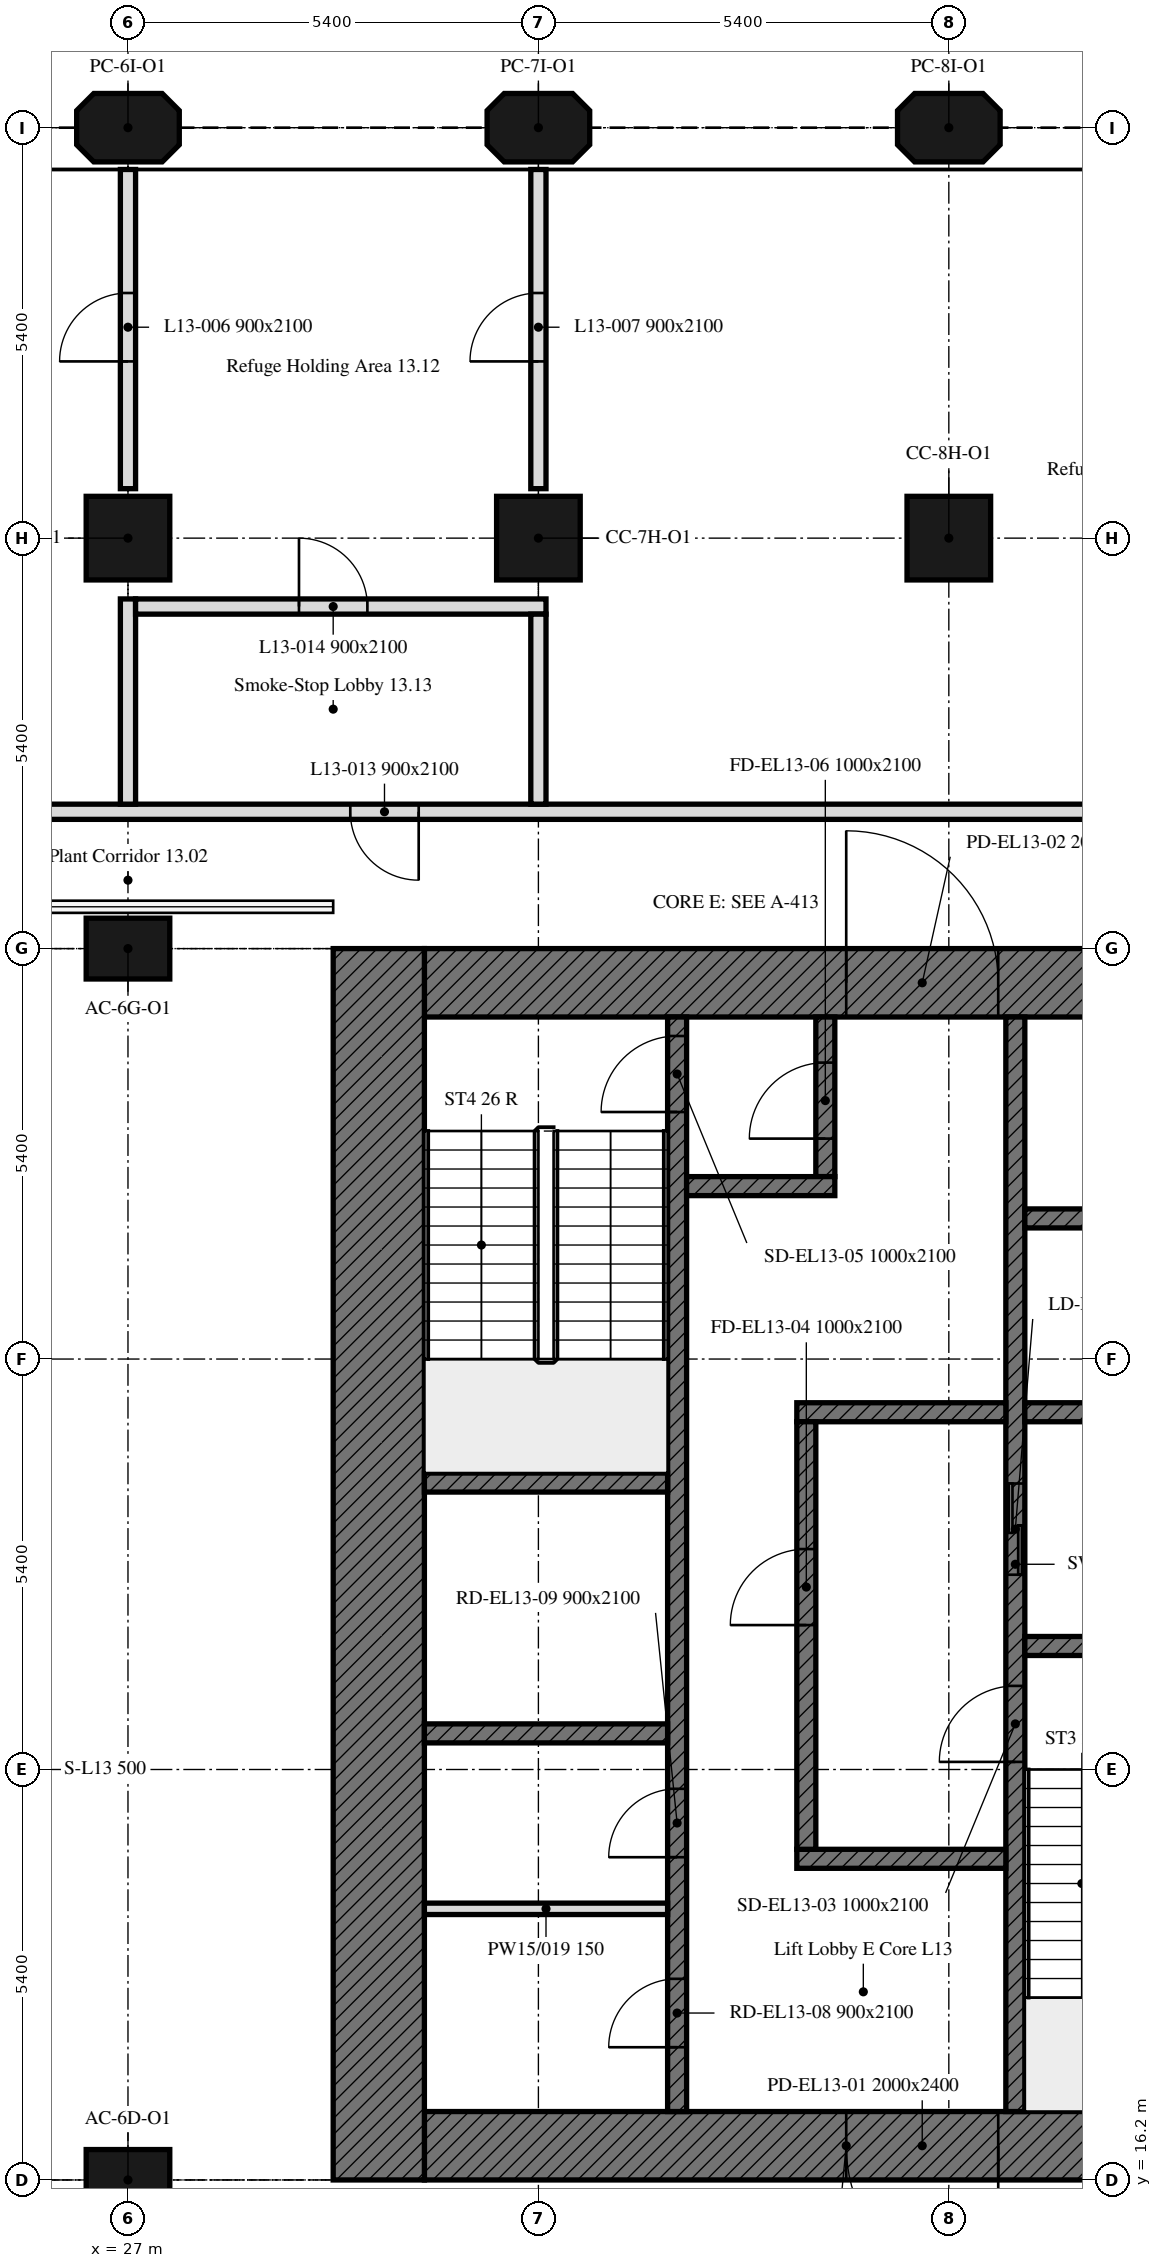
"""IFC4 building model, lengths in metres.
Left out: names, types, materials, properties, quantities, classifications, styles, units other than length and angle.
Written with IfcOpenShell. Run it as: python <this file> out.ifc"""

import sys

from ifc_helpers import new_model, si_unit, direction, frame, frame_2d, origin, origin_2d, place, context, subcontext, project, spatial, polyline, rectangle, outline, extrude, element, fill, save


model = new_model("IFC4")
c1 = context("Model", 3, precision=1e-05, world=origin(), true_north=direction((0.0, 1.0)))
c2 = subcontext(c1, "Body", "Model", "MODEL_VIEW")
j1 = project(units=[si_unit("LENGTHUNIT", "METRE"), si_unit("PLANEANGLEUNIT", "RADIAN")], contexts=[c1])
p1 = place(None, origin())
s1 = spatial("IfcSite", under=j1, at=p1, CompositionType="ELEMENT")
p2 = place(p1, origin())
s2 = spatial("IfcBuilding", under=s1, at=p2, CompositionType="ELEMENT")
p3 = place(p2, frame((0.0, 0.0, 60.2)))
s3 = spatial("IfcBuildingStorey", under=s2, at=p3, CompositionType="ELEMENT", Elevation=60.2)
for number, where, z_axis, x_axis in (
    (1, (27.0, 16.2, 0.0), (0.0, 0.0, 1.0), (1.0, 0.0, 0.0)),
    (2, (27.0, 32.4, 0.0), (0.0, 0.0, 1.0), (1.0, 0.0, 0.0)),
):
    element("IfcColumn", number, at=place(p3, frame(where, z_axis=z_axis, x_axis=x_axis)), inside=s3, PredefinedType="COLUMN", context=c2, shape_type="SweptSolid", body=[
        extrude(rectangle(XDim=1.1, YDim=0.8, at=origin_2d()), origin(), (0.0, 0.0, 1.0), 4.5),
    ])
for number, where, z_axis, x_axis in (
    (3, (27.0, 37.8, 0.0), (0.0, 0.0, 1.0), (1.0, 0.0, 0.0)),
    (4, (32.4, 37.8, 0.0), (0.0, 0.0, 1.0), (1.0, 0.0, 0.0)),
    (5, (37.8, 37.8, 0.0), (0.0, 0.0, 1.0), (1.0, 0.0, 0.0)),
):
    element("IfcColumn", number, at=place(p3, frame(where, z_axis=z_axis, x_axis=x_axis)), inside=s3, PredefinedType="COLUMN", context=c2, shape_type="SweptSolid", body=[
        extrude(rectangle(XDim=1.1, YDim=1.1, at=origin_2d()), origin(), (0.0, 0.0, 1.0), 4.5),
    ])
for number, where, z_axis, x_axis in (
    (6, (27.0, 43.2, 0.0), (0.0, 0.0, 1.0), (1.0, 0.0, 0.0)),
    (7, (32.4, 43.2, 0.0), (0.0, 0.0, 1.0), (1.0, 0.0, 0.0)),
    (8, (37.8, 43.2, 0.0), (0.0, 0.0, 1.0), (1.0, 0.0, 0.0)),
):
    element("IfcColumn", number, at=place(p3, frame(where, z_axis=z_axis, x_axis=x_axis)), inside=s3, PredefinedType="COLUMN", context=c2, shape_type="SweptSolid", body=[
        extrude(outline(polyline([(-0.45, -0.45), (0.45, -0.45), (0.675, -0.225), (0.675, 0.225), (0.45, 0.45), (-0.45, 0.45), (-0.675, 0.225), (-0.675, -0.225), (-0.45, -0.45)])), origin(), (0.0, 0.0, 1.0), 4.5),
    ])
p4 = place(p3, frame((42.0, 16.65, 0.0), z_axis=(0.0, 0.0, 1.0), x_axis=(-1.0, 0.0, 0.0)))
e9 = element("IfcWall", 9, at=p4, inside=s3, PredefinedType="SOLIDWALL", context=c2, shape_type="SweptSolid", body=[
    extrude(rectangle(XDim=11.1, YDim=0.9, at=frame_2d((5.55, 0.0))), origin(), (0.0, 0.0, 1.0), 4.5),
])
p5 = place(p4, frame((3.55, 0.0, 0.0)))
e10 = element("IfcOpeningElement", 10, at=p5, cuts=e9, PredefinedType="OPENING", context=c2, shape_type="SweptSolid", body=[
    extrude(rectangle(XDim=2.0, YDim=2.4, at=frame_2d((1.0, 1.2))), frame((0.0, 0.45, 0.0), z_axis=(0.0, -1.0, 0.0), x_axis=(1.0, 0.0, 0.0)), (0.0, 0.0, 1.0), 0.9),
])
p6 = place(p3, frame((30.9, 31.95, 0.0), z_axis=(0.0, 0.0, 1.0), x_axis=(1.0, 0.0, 0.0)))
e11 = element("IfcWall", 11, at=p6, inside=s3, PredefinedType="SOLIDWALL", context=c2, shape_type="SweptSolid", body=[
    extrude(rectangle(XDim=11.1, YDim=0.9, at=frame_2d((5.55, 0.0))), origin(), (0.0, 0.0, 1.0), 4.5),
])
p7 = place(p6, frame((5.55, 0.0, 0.0)))
e12 = element("IfcOpeningElement", 12, at=p7, cuts=e11, PredefinedType="OPENING", context=c2, shape_type="SweptSolid", body=[
    extrude(rectangle(XDim=2.0, YDim=2.4, at=frame_2d((1.0, 1.2))), frame((0.0, 0.45, 0.0), z_axis=(0.0, -1.0, 0.0), x_axis=(1.0, 0.0, 0.0)), (0.0, 0.0, 1.0), 0.9),
])
p8 = place(p3, frame((30.3, 16.2, 0.0), z_axis=(0.0, 0.0, 1.0), x_axis=(0.0, 1.0, 0.0)))
e13 = element("IfcWall", 13, at=p8, inside=s3, PredefinedType="SOLIDWALL", context=c2, shape_type="SweptSolid", body=[
    extrude(rectangle(XDim=16.2, YDim=1.2, at=frame_2d((8.1, 0.0))), origin(), (0.0, 0.0, 1.0), 4.5),
])
p9 = place(p3, frame((38.675, 17.1, 0.0), z_axis=(0.0, 0.0, 1.0), x_axis=(0.0, 1.0, 0.0)))
e14 = element("IfcWall", 14, at=p9, inside=s3, PredefinedType="SOLIDWALL", context=c2, shape_type="SweptSolid", body=[
    extrude(rectangle(XDim=14.4, YDim=0.25, at=frame_2d((7.2, 0.0))), origin(), (0.0, 0.0, 1.0), 4.5),
])
p10 = place(p9, frame((4.6, 0.0, 0.0)))
e15 = element("IfcOpeningElement", 15, at=p10, cuts=e14, PredefinedType="OPENING", context=c2, shape_type="SweptSolid", body=[
    extrude(rectangle(XDim=1.0, YDim=2.1, at=frame_2d((0.5, 1.05))), frame((0.0, 0.125, 0.0), z_axis=(0.0, -1.0, 0.0), x_axis=(1.0, 0.0, 0.0)), (0.0, 0.0, 1.0), 0.25),
])
p11 = place(p9, frame((7.062, 0.0, 0.0)))
e16 = element("IfcOpeningElement", 16, at=p11, cuts=e14, PredefinedType="OPENING", context=c2, shape_type="SweptSolid", body=[
    extrude(rectangle(XDim=1.2, YDim=2.1, at=frame_2d((0.6, 1.05))), frame((0.0, 0.125, 0.0), z_axis=(0.0, -1.0, 0.0), x_axis=(1.0, 0.0, 0.0)), (0.0, 0.0, 1.0), 0.25),
])
p12 = place(p3, frame((34.225, 17.1, 0.0), z_axis=(0.0, 0.0, 1.0), x_axis=(0.0, 1.0, 0.0)))
e17 = element("IfcWall", 17, at=p12, inside=s3, PredefinedType="SOLIDWALL", context=c2, shape_type="SweptSolid", body=[
    extrude(rectangle(XDim=14.4, YDim=0.25, at=frame_2d((7.2, 0.0))), origin(), (0.0, 0.0, 1.0), 4.5),
])
p13 = place(p12, frame((13.15, 0.0, 0.0)))
e18 = element("IfcOpeningElement", 18, at=p13, cuts=e17, PredefinedType="OPENING", context=c2, shape_type="SweptSolid", body=[
    extrude(rectangle(XDim=1.0, YDim=2.1, at=frame_2d((0.5, 1.05))), frame((0.0, 0.125, 0.0), z_axis=(0.0, -1.0, 0.0), x_axis=(1.0, 0.0, 0.0)), (0.0, 0.0, 1.0), 0.25),
])
p14 = place(p12, frame((0.846, 0.0, 0.0)))
e19 = element("IfcOpeningElement", 19, at=p14, cuts=e17, PredefinedType="OPENING", context=c2, shape_type="SweptSolid", body=[
    extrude(rectangle(XDim=0.9, YDim=2.1, at=frame_2d((0.45, 1.05))), frame((0.0, 0.125, 0.0), z_axis=(0.0, -1.0, 0.0), x_axis=(1.0, 0.0, 0.0)), (0.0, 0.0, 1.0), 0.25),
])
p15 = place(p12, frame((3.346, 0.0, 0.0)))
e20 = element("IfcOpeningElement", 20, at=p15, cuts=e17, PredefinedType="OPENING", context=c2, shape_type="SweptSolid", body=[
    extrude(rectangle(XDim=0.9, YDim=2.1, at=frame_2d((0.45, 1.05))), frame((0.0, 0.125, 0.0), z_axis=(0.0, -1.0, 0.0), x_axis=(1.0, 0.0, 0.0)), (0.0, 0.0, 1.0), 0.25),
])
p16 = place(p3, frame((38.8, 23.225, 0.0), z_axis=(0.0, 0.0, 1.0), x_axis=(1.0, 0.0, 0.0)))
e21 = element("IfcWall", 21, at=p16, inside=s3, PredefinedType="SOLIDWALL", context=c2, shape_type="SweptSolid", body=[
    extrude(rectangle(XDim=3.2, YDim=0.25, at=frame_2d((1.6, 0.0))), origin(), (0.0, 0.0, 1.0), 4.5),
])
for number, where, z_axis, x_axis in (
    (22, (30.9, 25.375, 0.0), (0.0, 0.0, 1.0), (1.0, 0.0, 0.0)),
    (23, (30.9, 22.075, 0.0), (0.0, 0.0, 1.0), (1.0, 0.0, 0.0)),
):
    element("IfcWall", number, at=place(p3, frame(where, z_axis=z_axis, x_axis=x_axis)), inside=s3, PredefinedType="SOLIDWALL", context=c2, shape_type="SweptSolid", body=[
        extrude(rectangle(XDim=3.2, YDim=0.25, at=frame_2d((1.6, 0.0))), origin(), (0.0, 0.0, 1.0), 4.5),
    ])
p17 = place(p3, frame((38.8, 26.3, 0.0), z_axis=(0.0, 0.0, 1.0), x_axis=(1.0, 0.0, 0.0)))
e24 = element("IfcWall", 24, at=p17, inside=s3, PredefinedType="SOLIDWALL", context=c2, shape_type="SweptSolid", body=[
    extrude(rectangle(XDim=3.2, YDim=0.25, at=frame_2d((1.6, 0.0))), origin(), (0.0, 0.0, 1.0), 4.5),
])
for number, where, z_axis, x_axis in (
    (25, (35.8, 26.3, 0.0), (0.0, 0.0, 1.0), (1.0, 0.0, 0.0)),
    (26, (35.8, 20.425, 0.0), (0.0, 0.0, 1.0), (1.0, 0.0, 0.0)),
):
    element("IfcWall", number, at=place(p3, frame(where, z_axis=z_axis, x_axis=x_axis)), inside=s3, PredefinedType="SOLIDWALL", context=c2, shape_type="SweptSolid", body=[
        extrude(rectangle(XDim=2.75, YDim=0.25, at=frame_2d((1.375, 0.0))), origin(), (0.0, 0.0, 1.0), 4.5),
    ])
p18 = place(p3, frame((36.175, 29.4, 0.0), z_axis=(0.0, 0.0, 1.0), x_axis=(0.0, 1.0, 0.0)))
e27 = element("IfcWall", 27, at=p18, inside=s3, PredefinedType="SOLIDWALL", context=c2, shape_type="SweptSolid", body=[
    extrude(rectangle(XDim=2.1, YDim=0.25, at=frame_2d((1.05, 0.0))), origin(), (0.0, 0.0, 1.0), 4.5),
])
p19 = place(p18, frame((0.5, 0.0, 0.0)))
e28 = element("IfcOpeningElement", 28, at=p19, cuts=e27, PredefinedType="OPENING", context=c2, shape_type="SweptSolid", body=[
    extrude(rectangle(XDim=1.0, YDim=2.1, at=frame_2d((0.5, 1.05))), frame((0.0, 0.125, 0.0), z_axis=(0.0, -1.0, 0.0), x_axis=(1.0, 0.0, 0.0)), (0.0, 0.0, 1.0), 0.25),
])
p20 = place(p3, frame((34.35, 29.275, 0.0), z_axis=(0.0, 0.0, 1.0), x_axis=(1.0, 0.0, 0.0)))
e29 = element("IfcWall", 29, at=p20, inside=s3, PredefinedType="SOLIDWALL", context=c2, shape_type="SweptSolid", body=[
    extrude(rectangle(XDim=1.95, YDim=0.25, at=frame_2d((0.975, 0.0))), origin(), (0.0, 0.0, 1.0), 4.5),
])
p21 = place(p3, frame((35.925, 20.55, 0.0), z_axis=(0.0, 0.0, 1.0), x_axis=(0.0, 1.0, 0.0)))
e30 = element("IfcWall", 30, at=p21, inside=s3, PredefinedType="SOLIDWALL", context=c2, shape_type="SweptSolid", body=[
    extrude(rectangle(XDim=5.625, YDim=0.25, at=frame_2d((2.812, 0.0))), origin(), (0.0, 0.0, 1.0), 4.5),
])
p22 = place(p21, frame((2.95, 0.0, 0.0)))
e31 = element("IfcOpeningElement", 31, at=p22, cuts=e30, PredefinedType="OPENING", context=c2, shape_type="SweptSolid", body=[
    extrude(rectangle(XDim=1.0, YDim=2.1, at=frame_2d((0.5, 1.05))), frame((0.0, 0.125, 0.0), z_axis=(0.0, -1.0, 0.0), x_axis=(1.0, 0.0, 0.0)), (0.0, 0.0, 1.0), 0.25),
])
p23 = place(p3, frame((38.8, 28.85, 0.0), z_axis=(0.0, 0.0, 1.0), x_axis=(1.0, 0.0, 0.0)))
e32 = element("IfcWall", 32, at=p23, inside=s3, PredefinedType="SOLIDWALL", context=c2, shape_type="SweptSolid", body=[
    extrude(rectangle(XDim=3.2, YDim=0.25, at=frame_2d((1.6, 0.0))), origin(), (0.0, 0.0, 1.0), 4.5),
])
p24 = place(p3, frame((30.9, 19.767, 0.0), z_axis=(0.0, 0.0, 1.0), x_axis=(1.0, 0.0, 0.0)))
e33 = element("IfcWall", 33, at=p24, inside=s3, PredefinedType="PARTITIONING", context=c2, shape_type="SweptSolid", body=[
    extrude(rectangle(XDim=3.2, YDim=0.15, at=frame_2d((1.6, 0.0))), origin(), (0.0, 0.0, 1.0), 4.5),
])
p25 = place(p3, frame((48.12, 34.2, 0.0), z_axis=(0.0, 0.0, 1.0), x_axis=(-1.0, 0.0, 0.0)))
e34 = element("IfcWall", 34, at=p25, inside=s3, PredefinedType="PARTITIONING", context=c2, shape_type="SweptSolid", body=[
    extrude(rectangle(XDim=42.47, YDim=0.2, at=frame_2d((21.235, 0.0))), origin(), (0.0, 0.0, 1.0), 3.75),
])
p26 = place(p25, frame((17.295, 0.0, 0.0)))
e35 = element("IfcOpeningElement", 35, at=p26, cuts=e34, PredefinedType="OPENING", context=c2, shape_type="SweptSolid", body=[
    extrude(rectangle(XDim=0.9, YDim=2.1, at=frame_2d((0.45, 1.05))), frame((0.0, 0.1, 0.0), z_axis=(0.0, -1.0, 0.0), x_axis=(1.0, 0.0, 0.0)), (0.0, 0.0, 1.0), 0.2),
])
p27 = place(p3, frame((27.0, 34.3, 0.0), z_axis=(0.0, 0.0, 1.0), x_axis=(0.0, 1.0, 0.0)))
e36 = element("IfcWall", 36, at=p27, inside=s3, PredefinedType="PARTITIONING", context=c2, shape_type="SweptSolid", body=[
    extrude(rectangle(XDim=2.7, YDim=0.2, at=frame_2d((1.35, 0.0))), origin(), (0.0, 0.0, 1.0), 3.75),
])
p28 = place(p3, frame((27.0, 38.451, 0.0), z_axis=(0.0, 0.0, 1.0), x_axis=(0.0, 1.0, 0.0)))
e37 = element("IfcWall", 37, at=p28, inside=s3, PredefinedType="PARTITIONING", context=c2, shape_type="SweptSolid", body=[
    extrude(rectangle(XDim=4.199, YDim=0.2, at=frame_2d((2.1, 0.0))), origin(), (0.0, 0.0, 1.0), 3.75),
])
p29 = place(p28, frame((1.674, 0.0, 0.0)))
e38 = element("IfcOpeningElement", 38, at=p29, cuts=e37, PredefinedType="OPENING", context=c2, shape_type="SweptSolid", body=[
    extrude(rectangle(XDim=0.9, YDim=2.1, at=frame_2d((0.45, 1.05))), frame((0.0, 0.1, 0.0), z_axis=(0.0, -1.0, 0.0), x_axis=(1.0, 0.0, 0.0)), (0.0, 0.0, 1.0), 0.2),
])
p30 = place(p3, frame((32.4, 38.451, 0.0), z_axis=(0.0, 0.0, 1.0), x_axis=(0.0, 1.0, 0.0)))
e39 = element("IfcWall", 39, at=p30, inside=s3, PredefinedType="PARTITIONING", context=c2, shape_type="SweptSolid", body=[
    extrude(rectangle(XDim=4.199, YDim=0.2, at=frame_2d((2.1, 0.0))), origin(), (0.0, 0.0, 1.0), 3.75),
])
p31 = place(p30, frame((1.674, 0.0, 0.0)))
e40 = element("IfcOpeningElement", 40, at=p31, cuts=e39, PredefinedType="OPENING", context=c2, shape_type="SweptSolid", body=[
    extrude(rectangle(XDim=0.9, YDim=2.1, at=frame_2d((0.45, 1.05))), frame((0.0, 0.1, 0.0), z_axis=(0.0, -1.0, 0.0), x_axis=(1.0, 0.0, 0.0)), (0.0, 0.0, 1.0), 0.2),
])
p32 = place(p3, frame((27.1, 36.9, 0.0), z_axis=(0.0, 0.0, 1.0), x_axis=(1.0, 0.0, 0.0)))
e41 = element("IfcWall", 41, at=p32, inside=s3, PredefinedType="PARTITIONING", context=c2, shape_type="SweptSolid", body=[
    extrude(rectangle(XDim=5.4, YDim=0.2, at=frame_2d((2.7, 0.0))), origin(), (0.0, 0.0, 1.0), 3.75),
])
p33 = place(p32, frame((2.15, 0.0, 0.0)))
e42 = element("IfcOpeningElement", 42, at=p33, cuts=e41, PredefinedType="OPENING", context=c2, shape_type="SweptSolid", body=[
    extrude(rectangle(XDim=0.9, YDim=2.1, at=frame_2d((0.45, 1.05))), frame((0.0, 0.1, 0.0), z_axis=(0.0, -1.0, 0.0), x_axis=(1.0, 0.0, 0.0)), (0.0, 0.0, 1.0), 0.2),
])
p34 = place(p3, frame((32.4, 36.8, 0.0), z_axis=(0.0, 0.0, 1.0), x_axis=(0.0, -1.0, 0.0)))
e43 = element("IfcWall", 43, at=p34, inside=s3, PredefinedType="PARTITIONING", context=c2, shape_type="SweptSolid", body=[
    extrude(rectangle(XDim=2.5, YDim=0.2, at=frame_2d((1.25, 0.0))), origin(), (0.0, 0.0, 1.0), 3.75),
])
p35 = place(p5, origin())
e44 = element("IfcDoor", 44, at=p35, inside=s3, OperationType="DOUBLE_DOOR_SINGLE_SWING", PredefinedType="DOOR", context=c2, shape_type="SweptSolid", body=[
    extrude(rectangle(XDim=2.0, YDim=2.4, at=frame_2d((1.0, 1.2))), frame((0.0, 0.025, 0.0), z_axis=(0.0, -1.0, 0.0), x_axis=(1.0, 0.0, 0.0)), (0.0, 0.0, 1.0), 0.05),
])
fill(e10, e44)
p36 = place(p7, origin())
e45 = element("IfcDoor", 45, at=p36, inside=s3, OperationType="DOUBLE_DOOR_SINGLE_SWING", PredefinedType="DOOR", context=c2, shape_type="SweptSolid", body=[
    extrude(rectangle(XDim=2.0, YDim=2.4, at=frame_2d((1.0, 1.2))), frame((0.0, 0.025, 0.0), z_axis=(0.0, -1.0, 0.0), x_axis=(1.0, 0.0, 0.0)), (0.0, 0.0, 1.0), 0.05),
])
fill(e12, e45)
p37 = place(p10, origin())
e46 = element("IfcDoor", 46, at=p37, inside=s3, OperationType="SINGLE_SWING_LEFT", PredefinedType="DOOR", context=c2, shape_type="SweptSolid", body=[
    extrude(rectangle(XDim=1.0, YDim=2.1, at=frame_2d((0.5, 1.05))), frame((0.0, 0.025, 0.0), z_axis=(0.0, -1.0, 0.0), x_axis=(1.0, 0.0, 0.0)), (0.0, 0.0, 1.0), 0.05),
])
fill(e15, e46)
p38 = place(p22, origin())
e47 = element("IfcDoor", 47, at=p38, inside=s3, OperationType="SINGLE_SWING_LEFT", PredefinedType="DOOR", context=c2, shape_type="SweptSolid", body=[
    extrude(rectangle(XDim=1.0, YDim=2.1, at=frame_2d((0.5, 1.05))), frame((0.0, 0.025, 0.0), z_axis=(0.0, -1.0, 0.0), x_axis=(1.0, 0.0, 0.0)), (0.0, 0.0, 1.0), 0.05),
])
fill(e31, e47)
p39 = place(p13, origin())
e48 = element("IfcDoor", 48, at=p39, inside=s3, OperationType="SINGLE_SWING_LEFT", PredefinedType="DOOR", context=c2, shape_type="SweptSolid", body=[
    extrude(rectangle(XDim=1.0, YDim=2.1, at=frame_2d((0.5, 1.05))), frame((0.0, 0.025, 0.0), z_axis=(0.0, -1.0, 0.0), x_axis=(1.0, 0.0, 0.0)), (0.0, 0.0, 1.0), 0.05),
])
fill(e18, e48)
p40 = place(p19, origin())
e49 = element("IfcDoor", 49, at=p40, inside=s3, OperationType="SINGLE_SWING_LEFT", PredefinedType="DOOR", context=c2, shape_type="SweptSolid", body=[
    extrude(rectangle(XDim=1.0, YDim=2.1, at=frame_2d((0.5, 1.05))), frame((0.0, 0.025, 0.0), z_axis=(0.0, -1.0, 0.0), x_axis=(1.0, 0.0, 0.0)), (0.0, 0.0, 1.0), 0.05),
])
fill(e28, e49)
p41 = place(p11, origin())
e50 = element("IfcDoor", 50, at=p41, inside=s3, OperationType="DOUBLE_DOOR_SLIDING", PredefinedType="DOOR", context=c2, shape_type="SweptSolid", body=[
    extrude(rectangle(XDim=1.2, YDim=2.1, at=frame_2d((0.6, 1.05))), frame((0.0, 0.025, 0.0), z_axis=(0.0, -1.0, 0.0), x_axis=(1.0, 0.0, 0.0)), (0.0, 0.0, 1.0), 0.05),
])
fill(e16, e50)
p42 = place(p14, origin())
e51 = element("IfcDoor", 51, at=p42, inside=s3, OperationType="SINGLE_SWING_LEFT", PredefinedType="DOOR", context=c2, shape_type="SweptSolid", body=[
    extrude(rectangle(XDim=0.9, YDim=2.1, at=frame_2d((0.45, 1.05))), frame((0.0, 0.025, 0.0), z_axis=(0.0, -1.0, 0.0), x_axis=(1.0, 0.0, 0.0)), (0.0, 0.0, 1.0), 0.05),
])
fill(e19, e51)
p43 = place(p15, origin())
e52 = element("IfcDoor", 52, at=p43, inside=s3, OperationType="SINGLE_SWING_LEFT", PredefinedType="DOOR", context=c2, shape_type="SweptSolid", body=[
    extrude(rectangle(XDim=0.9, YDim=2.1, at=frame_2d((0.45, 1.05))), frame((0.0, 0.025, 0.0), z_axis=(0.0, -1.0, 0.0), x_axis=(1.0, 0.0, 0.0)), (0.0, 0.0, 1.0), 0.05),
])
fill(e20, e52)
p44 = place(p29, origin())
e53 = element("IfcDoor", 53, at=p44, inside=s3, OperationType="SINGLE_SWING_RIGHT", PredefinedType="DOOR", context=c2, shape_type="SweptSolid", body=[
    extrude(rectangle(XDim=0.9, YDim=2.1, at=frame_2d((0.45, 1.05))), frame((0.0, 0.025, 0.0), z_axis=(0.0, -1.0, 0.0), x_axis=(1.0, 0.0, 0.0)), (0.0, 0.0, 1.0), 0.05),
])
fill(e38, e53)
p45 = place(p31, origin())
e54 = element("IfcDoor", 54, at=p45, inside=s3, OperationType="SINGLE_SWING_LEFT", PredefinedType="DOOR", context=c2, shape_type="SweptSolid", body=[
    extrude(rectangle(XDim=0.9, YDim=2.1, at=frame_2d((0.45, 1.05))), frame((0.0, 0.025, 0.0), z_axis=(0.0, -1.0, 0.0), x_axis=(1.0, 0.0, 0.0)), (0.0, 0.0, 1.0), 0.05),
])
fill(e40, e54)
p46 = place(p26, origin())
e55 = element("IfcDoor", 55, at=p46, inside=s3, OperationType="SINGLE_SWING_RIGHT", PredefinedType="DOOR", context=c2, shape_type="SweptSolid", body=[
    extrude(rectangle(XDim=0.9, YDim=2.1, at=frame_2d((0.45, 1.05))), frame((0.0, 0.025, 0.0), z_axis=(0.0, -1.0, 0.0), x_axis=(1.0, 0.0, 0.0)), (0.0, 0.0, 1.0), 0.05),
])
fill(e35, e55)
p47 = place(p33, origin())
e56 = element("IfcDoor", 56, at=p47, inside=s3, OperationType="SINGLE_SWING_RIGHT", PredefinedType="DOOR", context=c2, shape_type="SweptSolid", body=[
    extrude(rectangle(XDim=0.9, YDim=2.1, at=frame_2d((0.45, 1.05))), frame((0.0, 0.025, 0.0), z_axis=(0.0, -1.0, 0.0), x_axis=(1.0, 0.0, 0.0)), (0.0, 0.0, 1.0), 0.05),
])
fill(e42, e56)
save(model, sys.argv[1])
